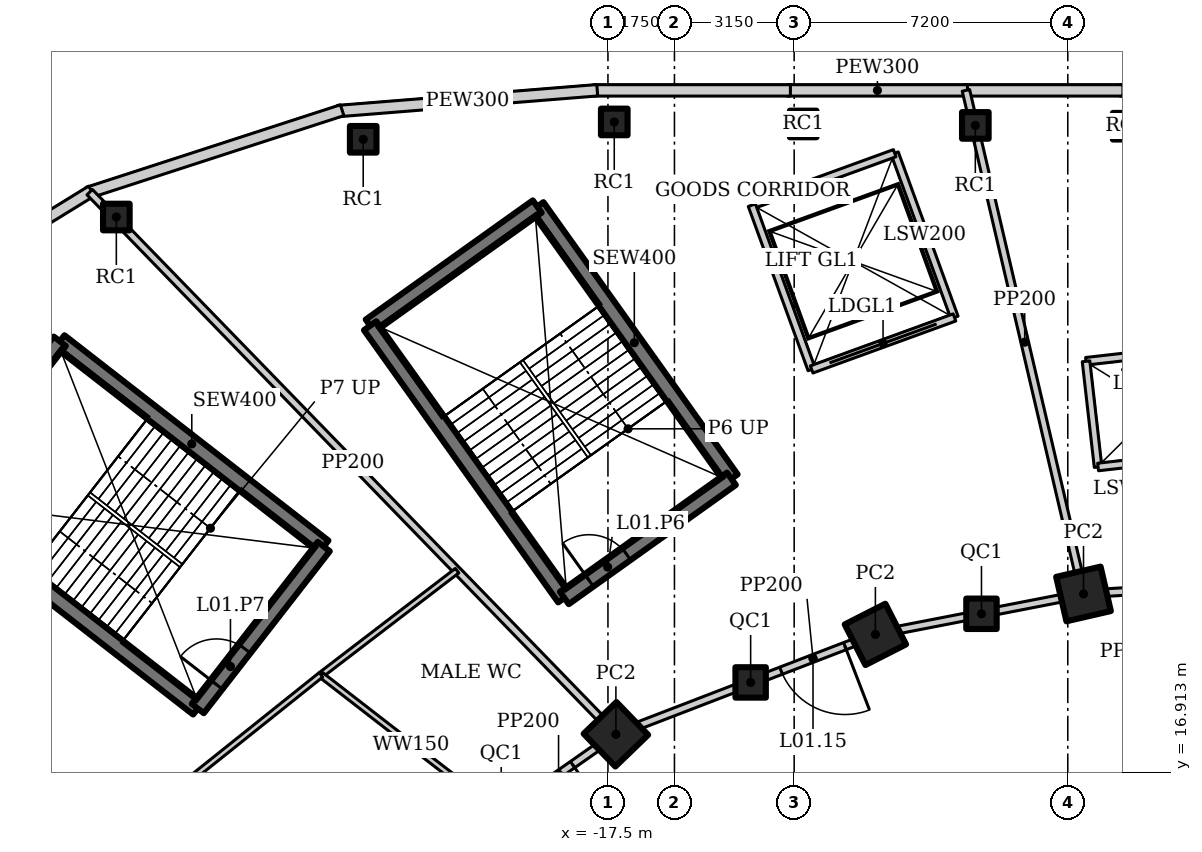
"""IFC4 building model, lengths in metres.
Left out: names, types, materials, properties, quantities, classifications, styles, units other than length and angle.
Written with IfcOpenShell. Run it as: python <this file> out.ifc"""

import sys

from ifc_helpers import new_model, si_unit, direction, frame, frame_2d, origin, origin_2d, place, context, subcontext, project, spatial, rectangle, hollow_rectangle, extrude, element, fill, save


model = new_model("IFC4")
c1 = context("Model", 3, precision=1e-05, world=origin(), true_north=direction((0.0, 1.0)))
c2 = subcontext(c1, "Body", "Model", "MODEL_VIEW")
j1 = project(units=[si_unit("LENGTHUNIT", "METRE"), si_unit("PLANEANGLEUNIT", "RADIAN")], contexts=[c1])
p1 = place(None, origin())
s1 = spatial("IfcSite", under=j1, at=p1, CompositionType="ELEMENT")
p2 = place(p1, origin())
s2 = spatial("IfcBuilding", under=s1, at=p2, CompositionType="ELEMENT")
p3 = place(p2, frame((0.0, 0.0, 6.5)))
s3 = spatial("IfcBuildingStorey", under=s2, at=p3, CompositionType="ELEMENT", Elevation=6.5)
for number, where, z_axis, x_axis in (
    (1, (-4.986, 21.598, 0.0), (0.0, 0.0, 1.0), (0.974, 0.225, 0.0)),
    (2, (-10.463, 20.534, 0.0), (0.0, 0.0, 1.0), (0.891, 0.454, 0.0)),
    (3, (-17.291, 17.905, 0.0), (0.0, 0.0, 1.0), (0.719, 0.695, 0.0)),
):
    element("IfcColumn", number, at=place(p3, frame(where, z_axis=z_axis, x_axis=x_axis)), inside=s3, PredefinedType="COLUMN", context=c2, shape_type="SweptSolid", body=[
        extrude(hollow_rectangle(XDim=1.2, YDim=1.2, WallThickness=0.1, at=origin_2d()), origin(), (0.0, 0.0, 1.0), 8.0),
    ])
for number, where, z_axis, x_axis in (
    (4, (-7.671, 21.076, 0.0), (0.0, 0.0, 1.0), (1.0, 0.0, 0.0)),
    (5, (-13.745, 19.27, 0.0), (0.0, 0.0, 1.0), (1.0, 0.0, 0.0)),
):
    element("IfcColumn", number, at=place(p3, frame(where, z_axis=z_axis, x_axis=x_axis)), inside=s3, PredefinedType="COLUMN", context=c2, shape_type="SweptSolid", body=[
        extrude(hollow_rectangle(XDim=0.8, YDim=0.8, WallThickness=0.05, at=origin_2d()), origin(), (0.0, 0.0, 1.0), 8.0),
    ])
for number, where, z_axis, x_axis in (
    (6, (-3.863, 33.907, 0.0), (0.0, 0.0, 1.0), (1.0, 0.0, 0.0)),
    (7, (-12.363, 33.966, 0.0), (0.0, 0.0, 1.0), (1.0, 0.0, 0.0)),
    (8, (-23.94, 33.563, 0.0), (0.0, 0.0, 1.0), (1.0, 0.0, 0.0)),
    (9, (-7.833, 33.928, 0.0), (0.0, 0.0, 1.0), (1.0, 0.0, 0.0)),
    (10, (-17.334, 34.02, 0.0), (0.0, 0.0, 1.0), (1.0, 0.0, 0.0)),
    (11, (-30.436, 31.518, 0.0), (0.0, 0.0, 1.0), (1.0, 0.0, 0.0)),
):
    element("IfcColumn", number, at=place(p3, frame(where, z_axis=z_axis, x_axis=x_axis)), inside=s3, PredefinedType="COLUMN", context=c2, shape_type="SweptSolid", body=[
        extrude(hollow_rectangle(XDim=0.7, YDim=0.7, WallThickness=0.04, at=origin_2d()), origin(), (0.0, 0.0, 1.0), 8.0),
    ])
p4 = place(p3, frame((0.04, 34.85, 0.0), z_axis=(0.0, 0.0, 1.0), x_axis=(-1.0, 0.0, 0.0)))
e12 = element("IfcWall", 12, at=p4, inside=s3, PredefinedType="SOLIDWALL", context=c2, shape_type="SweptSolid", body=[
    extrude(rectangle(XDim=4.068, YDim=0.3, at=frame_2d((2.034, 0.0))), origin(), (0.0, 0.0, 1.0), 7.8),
])
p5 = place(p3, frame((-3.948, 34.85, 0.0), z_axis=(0.0, 0.0, 1.0), x_axis=(-1.0, 0.0, 0.0)))
e13 = element("IfcWall", 13, at=p5, inside=s3, PredefinedType="SOLIDWALL", context=c2, shape_type="SweptSolid", body=[
    extrude(rectangle(XDim=4.173, YDim=0.3, at=frame_2d((2.086, 0.0))), origin(), (0.0, 0.0, 1.0), 7.8),
])
p6 = place(p3, frame((-8.04, 34.85, 0.0), z_axis=(0.0, 0.0, 1.0), x_axis=(-1.0, 0.0, 0.0)))
e14 = element("IfcWall", 14, at=p6, inside=s3, PredefinedType="SOLIDWALL", context=c2, shape_type="SweptSolid", body=[
    extrude(rectangle(XDim=4.739, YDim=0.3, at=frame_2d((2.369, 0.0))), origin(), (0.0, 0.0, 1.0), 7.8),
])
p7 = place(p3, frame((-12.699, 34.85, 0.0), z_axis=(0.0, 0.0, 1.0), x_axis=(-1.0, 0.0, 0.0)))
e15 = element("IfcWall", 15, at=p7, inside=s3, PredefinedType="SOLIDWALL", context=c2, shape_type="SweptSolid", body=[
    extrude(rectangle(XDim=5.174, YDim=0.3, at=frame_2d((2.587, 0.0))), origin(), (0.0, 0.0, 1.0), 7.8),
])
p8 = place(p3, frame((-17.781, 34.854, 0.0), z_axis=(0.0, 0.0, 1.0), x_axis=(-0.996791084449, -0.080047073422, 0.0)))
e16 = element("IfcWall", 16, at=p8, inside=s3, PredefinedType="SOLIDWALL", context=c2, shape_type="SweptSolid", body=[
    extrude(rectangle(XDim=6.847, YDim=0.3, at=frame_2d((3.424, 0.0))), origin(), (0.0, 0.0, 1.0), 7.8),
])
p9 = place(p3, frame((-24.495, 34.328, 0.0), z_axis=(0.0, 0.0, 1.0), x_axis=(-0.951140010357, -0.308759907853, 0.0)))
e17 = element("IfcWall", 17, at=p9, inside=s3, PredefinedType="SOLIDWALL", context=c2, shape_type="SweptSolid", body=[
    extrude(rectangle(XDim=7.041, YDim=0.3, at=frame_2d((3.521, 0.0))), origin(), (0.0, 0.0, 1.0), 7.8),
])
p10 = place(p3, frame((-31.088, 32.202, 0.0), z_axis=(0.0, 0.0, 1.0), x_axis=(-0.851808565246, -0.52385319334, 0.0)))
e18 = element("IfcWall", 18, at=p10, inside=s3, PredefinedType="SOLIDWALL", context=c2, shape_type="SweptSolid", body=[
    extrude(rectangle(XDim=6.861, YDim=0.3, at=frame_2d((3.43, 0.0))), origin(), (0.0, 0.0, 1.0), 7.8),
])
p11 = place(p3, frame((-2.478, 21.75, 0.0), z_axis=(0.0, 0.0, 1.0), x_axis=(-0.998172405641, -0.060430527186, 0.0)))
e19 = element("IfcWall", 19, at=p11, inside=s3, PredefinedType="SOLIDWALL", context=c2, shape_type="SweptSolid", body=[
    extrude(rectangle(XDim=2.513, YDim=0.2, at=frame_2d((1.256, 0.0))), origin(), (0.0, 0.0, 1.0), 7.35),
])
p12 = place(p3, frame((-4.986, 21.598, 0.0), z_axis=(0.0, 0.0, 1.0), x_axis=(-0.981637218105, -0.190757364289, 0.0)))
e20 = element("IfcWall", 20, at=p12, inside=s3, PredefinedType="SOLIDWALL", context=c2, shape_type="SweptSolid", body=[
    extrude(rectangle(XDim=2.735, YDim=0.2, at=frame_2d((1.368, 0.0))), origin(), (0.0, 0.0, 1.0), 7.2),
])
p13 = place(p3, frame((-7.671, 21.076, 0.0), z_axis=(0.0, 0.0, 1.0), x_axis=(-0.98163593748, -0.190763954266, 0.0)))
e21 = element("IfcWall", 21, at=p13, inside=s3, PredefinedType="SOLIDWALL", context=c2, shape_type="SweptSolid", body=[
    extrude(rectangle(XDim=2.844, YDim=0.2, at=frame_2d((1.422, 0.0))), origin(), (0.0, 0.0, 1.0), 7.396),
])
p14 = place(p3, frame((-10.463, 20.534, 0.0), z_axis=(0.0, 0.0, 1.0), x_axis=(-0.933241815012, -0.359248820058, 0.0)))
e22 = element("IfcWall", 22, at=p14, inside=s3, PredefinedType="SOLIDWALL", context=c2, shape_type="SweptSolid", body=[
    extrude(rectangle(XDim=3.518, YDim=0.2, at=frame_2d((1.759, 0.0))), origin(), (0.0, 0.0, 1.0), 7.396),
])
p15 = place(p14, frame((0.859, 0.0, 0.0)))
e23 = element("IfcOpeningElement", 23, at=p15, cuts=e22, PredefinedType="OPENING", context=c2, shape_type="SweptSolid", body=[
    extrude(rectangle(XDim=1.8, YDim=2.4, at=frame_2d((0.9, 1.2))), frame((0.0, 0.11, 0.0), z_axis=(0.0, -1.0, 0.0), x_axis=(1.0, 0.0, 0.0)), (0.0, 0.0, 1.0), 0.22),
])
p16 = place(p3, frame((-13.745, 19.27, 0.0), z_axis=(0.0, 0.0, 1.0), x_axis=(-0.933224646415, -0.359293416754, 0.0)))
e24 = element("IfcWall", 24, at=p16, inside=s3, PredefinedType="SOLIDWALL", context=c2, shape_type="SweptSolid", body=[
    extrude(rectangle(XDim=3.799, YDim=0.2, at=frame_2d((1.899, 0.0))), origin(), (0.0, 0.0, 1.0), 7.274),
])
p17 = place(p3, frame((-17.291, 17.905, 0.0), z_axis=(0.0, 0.0, 1.0), x_axis=(-0.819409395821, -0.573208724672, 0.0)))
e25 = element("IfcWall", 25, at=p17, inside=s3, PredefinedType="SOLIDWALL", context=c2, shape_type="SweptSolid", body=[
    extrude(rectangle(XDim=3.683, YDim=0.2, at=frame_2d((1.841, 0.0))), origin(), (0.0, 0.0, 1.0), 7.396),
])
p18 = place(p17, frame((1.391, 0.0, 0.0)))
e26 = element("IfcOpeningElement", 26, at=p18, cuts=e25, PredefinedType="OPENING", context=c2, shape_type="SweptSolid", body=[
    extrude(rectangle(XDim=0.9, YDim=2.1, at=frame_2d((0.45, 1.05))), frame((0.0, 0.11, 0.0), z_axis=(0.0, -1.0, 0.0), x_axis=(1.0, 0.0, 0.0)), (0.0, 0.0, 1.0), 0.22),
])
p19 = place(p3, frame((-4.986, 21.598, 0.0), z_axis=(0.0, 0.0, 1.0), x_axis=(-0.227360055616, 0.973810764528, 0.0)))
e27 = element("IfcWall", 27, at=p19, inside=s3, PredefinedType="SOLIDWALL", context=c2, shape_type="SweptSolid", body=[
    extrude(rectangle(XDim=13.608, YDim=0.2, at=frame_2d((6.804, 0.0))), origin(), (0.0, 0.0, 1.0), 7.028),
])
p20 = place(p3, frame((-17.291, 17.905, 0.0), z_axis=(0.0, 0.0, 1.0), x_axis=(-0.696460684513, 0.717594951855, 0.0)))
e28 = element("IfcWall", 28, at=p20, inside=s3, PredefinedType="SOLIDWALL", context=c2, shape_type="SweptSolid", body=[
    extrude(rectangle(XDim=19.881, YDim=0.2, at=frame_2d((9.94, 0.0))), origin(), (0.0, 0.0, 1.0), 6.3),
])
p21 = place(p3, frame((-21.469, 22.211, 0.0), z_axis=(0.0, 0.0, 1.0), x_axis=(-0.794122703503, -0.607757461313, 0.0)))
e29 = element("IfcWall", 29, at=p21, inside=s3, PredefinedType="SOLIDWALL", context=c2, shape_type="SweptSolid", body=[
    extrude(rectangle(XDim=4.51, YDim=0.15, at=frame_2d((2.255, 0.0))), origin(), (0.0, 0.0, 1.0), 7.8),
])
p22 = place(p3, frame((-20.309, 15.794, 0.0), z_axis=(0.0, 0.0, 1.0), x_axis=(-0.790437708207, 0.61254243073, 0.0)))
e30 = element("IfcWall", 30, at=p22, inside=s3, PredefinedType="SOLIDWALL", context=c2, shape_type="SweptSolid", body=[
    extrude(rectangle(XDim=6.0, YDim=0.15, at=frame_2d((3.0, 0.0))), origin(), (0.0, 0.0, 1.0), 7.8),
])
p23 = place(p3, frame((-25.051, 19.469, 0.0), z_axis=(0.0, 0.0, 1.0), x_axis=(-0.781204641684, -0.624275025779, 0.0)))
e31 = element("IfcWall", 31, at=p23, inside=s3, PredefinedType="SOLIDWALL", context=c2, shape_type="SweptSolid", body=[
    extrude(rectangle(XDim=4.821, YDim=0.15, at=frame_2d((2.411, 0.0))), origin(), (0.0, 0.0, 1.0), 7.8),
])
p24 = place(p3, frame((-14.251, 24.629, 0.0), z_axis=(0.0, 0.0, 1.0), x_axis=(-0.580705313356, 0.814113836659, 0.0)))
e32 = element("IfcWall", 32, at=p24, inside=s3, PredefinedType="SHEAR", context=c2, shape_type="SweptSolid", body=[
    extrude(rectangle(XDim=8.8, YDim=0.4, at=frame_2d((4.4, 0.0))), origin(), (0.0, 0.0, 1.0), 8.0),
])
p25 = place(p3, frame((-19.361, 31.793, 0.0), z_axis=(0.0, 0.0, 1.0), x_axis=(-0.814121252423, -0.580694916762, 0.0)))
e33 = element("IfcWall", 33, at=p25, inside=s3, PredefinedType="SHEAR", context=c2, shape_type="SweptSolid", body=[
    extrude(rectangle(XDim=5.4, YDim=0.4, at=frame_2d((2.7, 0.0))), origin(), (0.0, 0.0, 1.0), 8.0),
])
p26 = place(p3, frame((-23.757, 28.657, 0.0), z_axis=(0.0, 0.0, 1.0), x_axis=(0.580705313356, -0.814113836659, 0.0)))
e34 = element("IfcWall", 34, at=p26, inside=s3, PredefinedType="SHEAR", context=c2, shape_type="SweptSolid", body=[
    extrude(rectangle(XDim=8.8, YDim=0.4, at=frame_2d((4.4, 0.0))), origin(), (0.0, 0.0, 1.0), 8.0),
])
p27 = place(p3, frame((-18.647, 21.493, 0.0), z_axis=(0.0, 0.0, 1.0), x_axis=(0.814121252423, 0.580694916762, 0.0)))
e35 = element("IfcWall", 35, at=p27, inside=s3, PredefinedType="SHEAR", context=c2, shape_type="SweptSolid", body=[
    extrude(rectangle(XDim=5.4, YDim=0.4, at=frame_2d((2.7, 0.0))), origin(), (0.0, 0.0, 1.0), 8.0),
])
p28 = place(p27, frame((0.8, 0.0, 0.0)))
e36 = element("IfcOpeningElement", 36, at=p28, cuts=e35, PredefinedType="OPENING", context=c2, shape_type="SweptSolid", body=[
    extrude(rectangle(XDim=1.2, YDim=2.1, at=frame_2d((0.6, 1.05))), frame((0.0, 0.21, 0.0), z_axis=(0.0, -1.0, 0.0), x_axis=(1.0, 0.0, 0.0)), (0.0, 0.0, 1.0), 0.42),
])
p29 = place(p3, frame((-24.978, 22.846, 0.0), z_axis=(0.0, 0.0, 1.0), x_axis=(-0.78938060008, 0.613904119726, 0.0)))
e37 = element("IfcWall", 37, at=p29, inside=s3, PredefinedType="SHEAR", context=c2, shape_type="SweptSolid", body=[
    extrude(rectangle(XDim=8.8, YDim=0.4, at=frame_2d((4.4, 0.0))), origin(), (0.0, 0.0, 1.0), 8.0),
])
p30 = place(p3, frame((-31.924, 28.248, 0.0), z_axis=(0.0, 0.0, 1.0), x_axis=(-0.613912443548, -0.789374126544, 0.0)))
e38 = element("IfcWall", 38, at=p30, inside=s3, PredefinedType="SHEAR", context=c2, shape_type="SweptSolid", body=[
    extrude(rectangle(XDim=5.4, YDim=0.4, at=frame_2d((2.7, 0.0))), origin(), (0.0, 0.0, 1.0), 8.0),
])
p31 = place(p3, frame((-35.239, 23.985, 0.0), z_axis=(0.0, 0.0, 1.0), x_axis=(0.78938060008, -0.613904119726, 0.0)))
e39 = element("IfcWall", 39, at=p31, inside=s3, PredefinedType="SHEAR", context=c2, shape_type="SweptSolid", body=[
    extrude(rectangle(XDim=8.8, YDim=0.4, at=frame_2d((4.4, 0.0))), origin(), (0.0, 0.0, 1.0), 8.0),
])
p32 = place(p3, frame((-28.293, 18.583, 0.0), z_axis=(0.0, 0.0, 1.0), x_axis=(0.613912443548, 0.789374126544, 0.0)))
e40 = element("IfcWall", 40, at=p32, inside=s3, PredefinedType="SHEAR", context=c2, shape_type="SweptSolid", body=[
    extrude(rectangle(XDim=5.4, YDim=0.4, at=frame_2d((2.7, 0.0))), origin(), (0.0, 0.0, 1.0), 8.0),
])
p33 = place(p32, frame((0.8, 0.0, 0.0)))
e41 = element("IfcOpeningElement", 41, at=p33, cuts=e40, PredefinedType="OPENING", context=c2, shape_type="SweptSolid", body=[
    extrude(rectangle(XDim=1.2, YDim=2.1, at=frame_2d((0.6, 1.05))), frame((0.0, 0.21, 0.0), z_axis=(0.0, -1.0, 0.0), x_axis=(1.0, 0.0, 0.0)), (0.0, 0.0, 1.0), 0.42),
])
p34 = place(p3, frame((-1.442, 28.117, 0.0), z_axis=(0.0, 0.0, 1.0), x_axis=(-0.993571061716, -0.113210182053, 0.0)))
e42 = element("IfcWall", 42, at=p34, inside=s3, PredefinedType="SOLIDWALL", context=c2, shape_type="SweptSolid", body=[
    extrude(rectangle(XDim=3.5, YDim=0.2, at=frame_2d((1.75, 0.0))), origin(), (0.0, 0.0, 1.0), 7.8),
])
p35 = place(p3, frame((-4.92, 27.721, 0.0), z_axis=(0.0, 0.0, 1.0), x_axis=(0.113177712989, -0.993574760792, 0.0)))
e43 = element("IfcWall", 43, at=p35, inside=s3, PredefinedType="SOLIDWALL", context=c2, shape_type="SweptSolid", body=[
    extrude(rectangle(XDim=2.8, YDim=0.2, at=frame_2d((1.4, 0.0))), origin(), (0.0, 0.0, 1.0), 7.8),
])
p36 = place(p3, frame((-4.603, 24.939, 0.0), z_axis=(0.0, 0.0, 1.0), x_axis=(0.993571061716, 0.113210182053, 0.0)))
e44 = element("IfcWall", 44, at=p36, inside=s3, PredefinedType="SOLIDWALL", context=c2, shape_type="SweptSolid", body=[
    extrude(rectangle(XDim=3.5, YDim=0.2, at=frame_2d((1.75, 0.0))), origin(), (0.0, 0.0, 1.0), 7.8),
])
p37 = place(p36, frame((1.2, 0.0, 0.0)))
e45 = element("IfcOpeningElement", 45, at=p37, cuts=e44, PredefinedType="OPENING", context=c2, shape_type="SweptSolid", body=[
    extrude(rectangle(XDim=1.1, YDim=2.2, at=frame_2d((0.55, 1.1))), frame((0.0, 0.11, 0.0), z_axis=(0.0, -1.0, 0.0), x_axis=(1.0, 0.0, 0.0)), (0.0, 0.0, 1.0), 0.22),
])
p38 = place(p3, frame((-8.381, 28.875, 0.0), z_axis=(0.0, 0.0, 1.0), x_axis=(-0.342045591466, 0.93968335803, 0.0)))
e46 = element("IfcWall", 46, at=p38, inside=s3, PredefinedType="SOLIDWALL", context=c2, shape_type="SweptSolid", body=[
    extrude(rectangle(XDim=4.6, YDim=0.2, at=frame_2d((2.3, 0.0))), origin(), (0.0, 0.0, 1.0), 7.8),
])
p39 = place(p3, frame((-9.955, 33.198, 0.0), z_axis=(0.0, 0.0, 1.0), x_axis=(-0.939686455819, -0.342037080957, 0.0)))
e47 = element("IfcWall", 47, at=p39, inside=s3, PredefinedType="SOLIDWALL", context=c2, shape_type="SweptSolid", body=[
    extrude(rectangle(XDim=4.0, YDim=0.2, at=frame_2d((2.0, 0.0))), origin(), (0.0, 0.0, 1.0), 7.8),
])
p40 = place(p3, frame((-13.713, 31.829, 0.0), z_axis=(0.0, 0.0, 1.0), x_axis=(0.342062650202, -0.939677148459, 0.0)))
e48 = element("IfcWall", 48, at=p40, inside=s3, PredefinedType="SOLIDWALL", context=c2, shape_type="SweptSolid", body=[
    extrude(rectangle(XDim=4.6, YDim=0.2, at=frame_2d((2.3, 0.0))), origin(), (0.0, 0.0, 1.0), 7.8),
])
p41 = place(p3, frame((-12.14, 27.507, 0.0), z_axis=(0.0, 0.0, 1.0), x_axis=(0.939706071622, 0.341983185197, 0.0)))
e49 = element("IfcWall", 49, at=p41, inside=s3, PredefinedType="SOLIDWALL", context=c2, shape_type="SweptSolid", body=[
    extrude(rectangle(XDim=4.0, YDim=0.2, at=frame_2d((2.0, 0.0))), origin(), (0.0, 0.0, 1.0), 7.8),
])
p42 = place(p41, frame((0.5, 0.0, 0.0)))
e50 = element("IfcOpeningElement", 50, at=p42, cuts=e49, PredefinedType="OPENING", context=c2, shape_type="SweptSolid", body=[
    extrude(rectangle(XDim=3.0, YDim=3.0, at=frame_2d((1.5, 1.5))), frame((0.0, 0.11, 0.0), z_axis=(0.0, -1.0, 0.0), x_axis=(1.0, 0.0, 0.0)), (0.0, 0.0, 1.0), 0.22),
])
p43 = place(p15, origin())
e51 = element("IfcDoor", 51, at=p43, inside=s3, OperationType="DOUBLE_DOOR_DOUBLE_SWING", PredefinedType="DOOR", context=c2, shape_type="SweptSolid", body=[
    extrude(rectangle(XDim=1.8, YDim=2.4, at=frame_2d((0.9, 1.2))), frame((0.0, 0.025, 0.0), z_axis=(0.0, -1.0, 0.0), x_axis=(1.0, 0.0, 0.0)), (0.0, 0.0, 1.0), 0.05),
])
fill(e23, e51)
p44 = place(p18, origin())
e52 = element("IfcDoor", 52, at=p44, inside=s3, OperationType="SINGLE_SWING_LEFT", PredefinedType="DOOR", context=c2, shape_type="SweptSolid", body=[
    extrude(rectangle(XDim=0.9, YDim=2.1, at=frame_2d((0.45, 1.05))), frame((0.0, 0.025, 0.0), z_axis=(0.0, -1.0, 0.0), x_axis=(1.0, 0.0, 0.0)), (0.0, 0.0, 1.0), 0.05),
])
fill(e26, e52)
p45 = place(p28, origin())
e53 = element("IfcDoor", 53, at=p45, inside=s3, OperationType="SINGLE_SWING_RIGHT", PredefinedType="DOOR", context=c2, shape_type="SweptSolid", body=[
    extrude(rectangle(XDim=1.2, YDim=2.1, at=frame_2d((0.6, 1.05))), frame((0.0, 0.025, 0.0), z_axis=(0.0, -1.0, 0.0), x_axis=(1.0, 0.0, 0.0)), (0.0, 0.0, 1.0), 0.05),
])
fill(e36, e53)
p46 = place(p33, origin())
e54 = element("IfcDoor", 54, at=p46, inside=s3, OperationType="SINGLE_SWING_RIGHT", PredefinedType="DOOR", context=c2, shape_type="SweptSolid", body=[
    extrude(rectangle(XDim=1.2, YDim=2.1, at=frame_2d((0.6, 1.05))), frame((0.0, 0.025, 0.0), z_axis=(0.0, -1.0, 0.0), x_axis=(1.0, 0.0, 0.0)), (0.0, 0.0, 1.0), 0.05),
])
fill(e41, e54)
p47 = place(p42, origin())
e55 = element("IfcDoor", 55, at=p47, inside=s3, OperationType="DOUBLE_DOOR_SLIDING", PredefinedType="DOOR", context=c2, shape_type="SweptSolid", body=[
    extrude(rectangle(XDim=3.0, YDim=3.0, at=frame_2d((1.5, 1.5))), frame((0.0, 0.025, 0.0), z_axis=(0.0, -1.0, 0.0), x_axis=(1.0, 0.0, 0.0)), (0.0, 0.0, 1.0), 0.05),
])
fill(e50, e55)
save(model, sys.argv[1])
